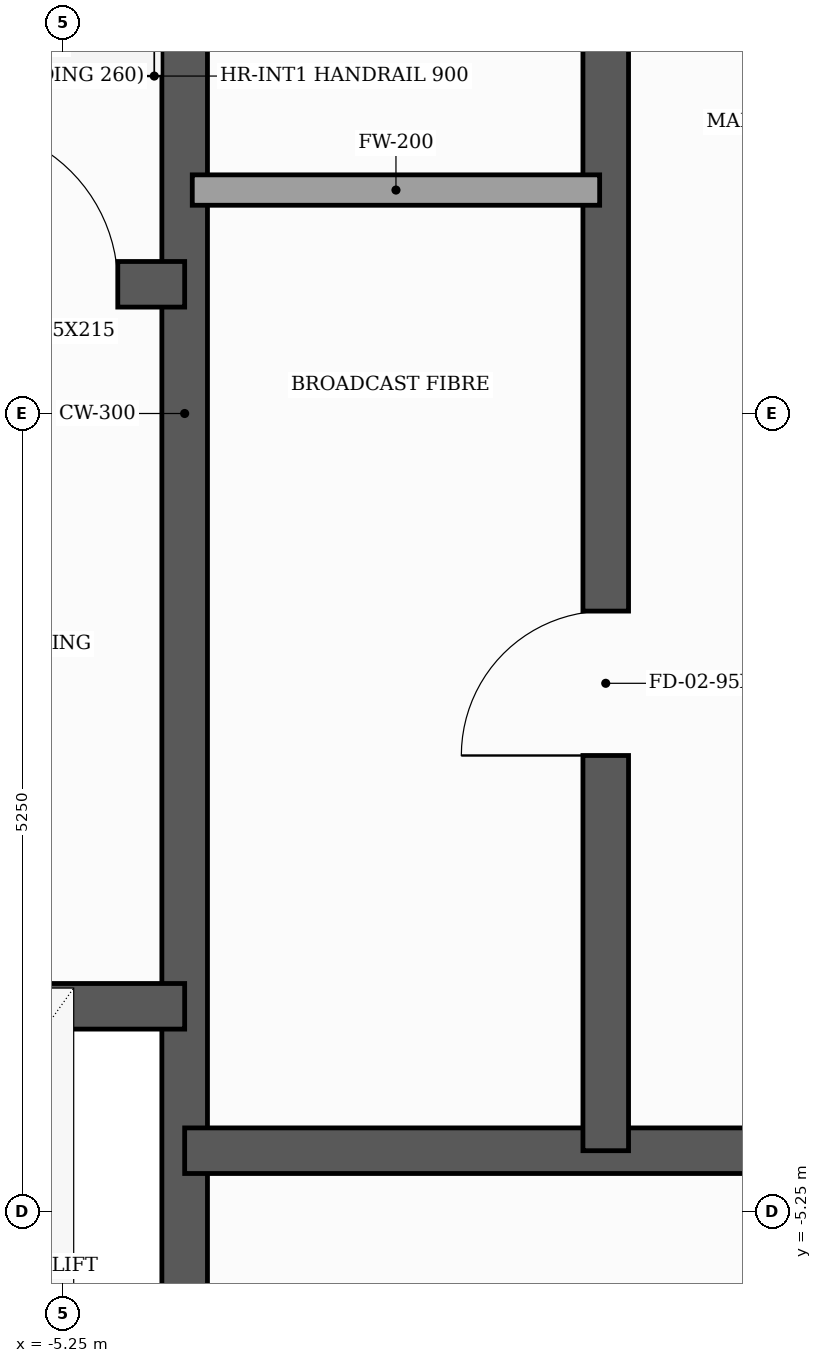
"""IFC4 building model, lengths in metres.
Left out: names, types, materials, properties, quantities, classifications, styles, units other than length and angle.
Written with IfcOpenShell. Run it as: python <this file> out.ifc"""

import sys

from ifc_helpers import new_model, si_unit, direction, frame, frame_2d, origin, place, context, subcontext, project, spatial, rectangle, extrude, element, fill, save


model = new_model("IFC4")
c1 = context("Model", 3, precision=1e-05, world=origin(), true_north=direction((0.0, 1.0)))
c2 = subcontext(c1, "Body", "Model", "MODEL_VIEW")
j1 = project(units=[si_unit("LENGTHUNIT", "METRE"), si_unit("PLANEANGLEUNIT", "RADIAN")], contexts=[c1])
p1 = place(None, origin())
s1 = spatial("IfcSite", under=j1, at=p1, CompositionType="ELEMENT")
p2 = place(p1, origin())
s2 = spatial("IfcBuilding", under=s1, at=p2, CompositionType="ELEMENT")
p3 = place(p2, frame((0.0, 0.0, 149.5)))
s3 = spatial("IfcBuildingStorey", under=s2, at=p3, CompositionType="ELEMENT", Elevation=149.5)
p4 = place(p3, frame((-8.98, -27.791, 0.0), z_axis=(0.0, 0.0, 1.0), x_axis=(0.809017151105, 0.587785036572, 0.0)))
e1 = element("IfcWall", 1, at=p4, inside=s3, PredefinedType="SOLIDWALL", context=c2, shape_type="SweptSolid", body=[
    extrude(rectangle(XDim=47.2, YDim=0.22, at=frame_2d((23.6, 0.0))), origin(), (0.0, 0.0, 1.0), 4.4),
])
p5 = place(p3, frame((-4.45, -7.79, 0.0), z_axis=(0.0, 0.0, 1.0), x_axis=(0.0, 1.0, 0.0)))
e2 = element("IfcWall", 2, at=p5, inside=s3, PredefinedType="SHEAR", context=c2, shape_type="SweptSolid", body=[
    extrude(rectangle(XDim=15.58, YDim=0.3, at=frame_2d((7.79, 0.0))), origin(), (0.0, 0.0, 1.0), 4.9),
])
p6 = place(p3, frame((-7.79, 0.85, 0.0), z_axis=(0.0, 0.0, 1.0), x_axis=(1.0, 0.0, 0.0)))
e3 = element("IfcWall", 3, at=p6, inside=s3, PredefinedType="SHEAR", context=c2, shape_type="SweptSolid", body=[
    extrude(rectangle(XDim=3.34, YDim=0.3, at=frame_2d((1.67, 0.0))), origin(), (0.0, 0.0, 1.0), 4.9),
])
p7 = place(p6, frame((1.85, 0.0, 0.0)))
e4 = element("IfcOpeningElement", 4, at=p7, cuts=e3, PredefinedType="OPENING", context=c2, shape_type="SweptSolid", body=[
    extrude(rectangle(XDim=1.05, YDim=2.15, at=frame_2d((0.525, 1.075))), frame((0.0, 0.16, 0.0), z_axis=(0.0, -1.0, 0.0), x_axis=(1.0, 0.0, 0.0)), (0.0, 0.0, 1.0), 0.32),
])
p8 = place(p3, frame((-7.79, -3.9, 0.0), z_axis=(0.0, 0.0, 1.0), x_axis=(1.0, 0.0, 0.0)))
e5 = element("IfcWall", 5, at=p8, inside=s3, PredefinedType="SHEAR", context=c2, shape_type="SweptSolid", body=[
    extrude(rectangle(XDim=3.34, YDim=0.3, at=frame_2d((1.67, 0.0))), origin(), (0.0, 0.0, 1.0), 4.9),
])
p9 = place(p8, frame((1.27, 0.0, 0.0)))
e6 = element("IfcOpeningElement", 6, at=p9, cuts=e5, PredefinedType="OPENING", context=c2, shape_type="SweptSolid", body=[
    extrude(rectangle(XDim=1.1, YDim=2.1, at=frame_2d((0.55, 1.05))), frame((0.0, 0.16, 0.0), z_axis=(0.0, -1.0, 0.0), x_axis=(1.0, 0.0, 0.0)), (0.0, 0.0, 1.0), 0.32),
])
p10 = place(p3, frame((-4.45, -4.85, 0.0), z_axis=(0.0, 0.0, 1.0), x_axis=(1.0, 0.0, 0.0)))
e7 = element("IfcWall", 7, at=p10, inside=s3, PredefinedType="SHEAR", context=c2, shape_type="SweptSolid", body=[
    extrude(rectangle(XDim=8.9, YDim=0.3, at=frame_2d((4.45, 0.0))), origin(), (0.0, 0.0, 1.0), 4.9),
])
p11 = place(p3, frame((-1.68, -4.85, 0.0), z_axis=(0.0, 0.0, 1.0), x_axis=(0.0, 1.0, 0.0)))
e8 = element("IfcWall", 8, at=p11, inside=s3, PredefinedType="SHEAR", context=c2, shape_type="SweptSolid", body=[
    extrude(rectangle(XDim=12.64, YDim=0.3, at=frame_2d((6.32, 0.0))), origin(), (0.0, 0.0, 1.0), 4.9),
])
p12 = place(p11, frame((2.6, 0.0, 0.0)))
e9 = element("IfcOpeningElement", 9, at=p12, cuts=e8, PredefinedType="OPENING", context=c2, shape_type="SweptSolid", body=[
    extrude(rectangle(XDim=0.95, YDim=2.1, at=frame_2d((0.475, 1.05))), frame((0.0, 0.16, 0.0), z_axis=(0.0, -1.0, 0.0), x_axis=(1.0, 0.0, 0.0)), (0.0, 0.0, 1.0), 0.32),
])
p13 = place(p11, frame((8.8, 0.0, 0.0)))
e10 = element("IfcOpeningElement", 10, at=p13, cuts=e8, PredefinedType="OPENING", context=c2, shape_type="SweptSolid", body=[
    extrude(rectangle(XDim=0.95, YDim=2.1, at=frame_2d((0.475, 1.05))), frame((0.0, 0.16, 0.0), z_axis=(0.0, -1.0, 0.0), x_axis=(1.0, 0.0, 0.0)), (0.0, 0.0, 1.0), 0.32),
])
p14 = place(p3, frame((-4.4, 1.47, 0.0), z_axis=(0.0, 0.0, 1.0), x_axis=(1.0, 0.0, 0.0)))
e11 = element("IfcWall", 11, at=p14, inside=s3, PredefinedType="SOLIDWALL", context=c2, shape_type="SweptSolid", body=[
    extrude(rectangle(XDim=2.68, YDim=0.2, at=frame_2d((1.34, 0.0))), origin(), (0.0, 0.0, 1.0), 4.9),
])
p15 = place(p3, frame((28.291, 0.894, 0.0), z_axis=(0.0, 0.0, 1.0), x_axis=(-0.80901669073, -0.587785670223, 0.0)))
e12 = element("IfcWall", 12, at=p15, inside=s3, PredefinedType="SOLIDWALL", context=c2, shape_type="SweptSolid", body=[
    extrude(rectangle(XDim=46.826, YDim=0.16, at=frame_2d((23.413, 0.0))), origin(), (0.0, 0.0, 1.0), 3.485),
])
p16 = place(p7, origin())
e13 = element("IfcDoor", 13, at=p16, inside=s3, OperationType="SINGLE_SWING_LEFT", PredefinedType="DOOR", context=c2, shape_type="SweptSolid", body=[
    extrude(rectangle(XDim=1.05, YDim=2.15, at=frame_2d((0.525, 1.075))), frame((0.0, 0.025, 0.0), z_axis=(0.0, -1.0, 0.0), x_axis=(1.0, 0.0, 0.0)), (0.0, 0.0, 1.0), 0.05),
])
fill(e4, e13)
p17 = place(p12, origin())
e14 = element("IfcDoor", 14, at=p17, inside=s3, OperationType="SINGLE_SWING_LEFT", PredefinedType="DOOR", context=c2, shape_type="SweptSolid", body=[
    extrude(rectangle(XDim=0.95, YDim=2.1, at=frame_2d((0.475, 1.05))), frame((0.0, 0.025, 0.0), z_axis=(0.0, -1.0, 0.0), x_axis=(1.0, 0.0, 0.0)), (0.0, 0.0, 1.0), 0.05),
])
fill(e9, e14)
save(model, sys.argv[1])
